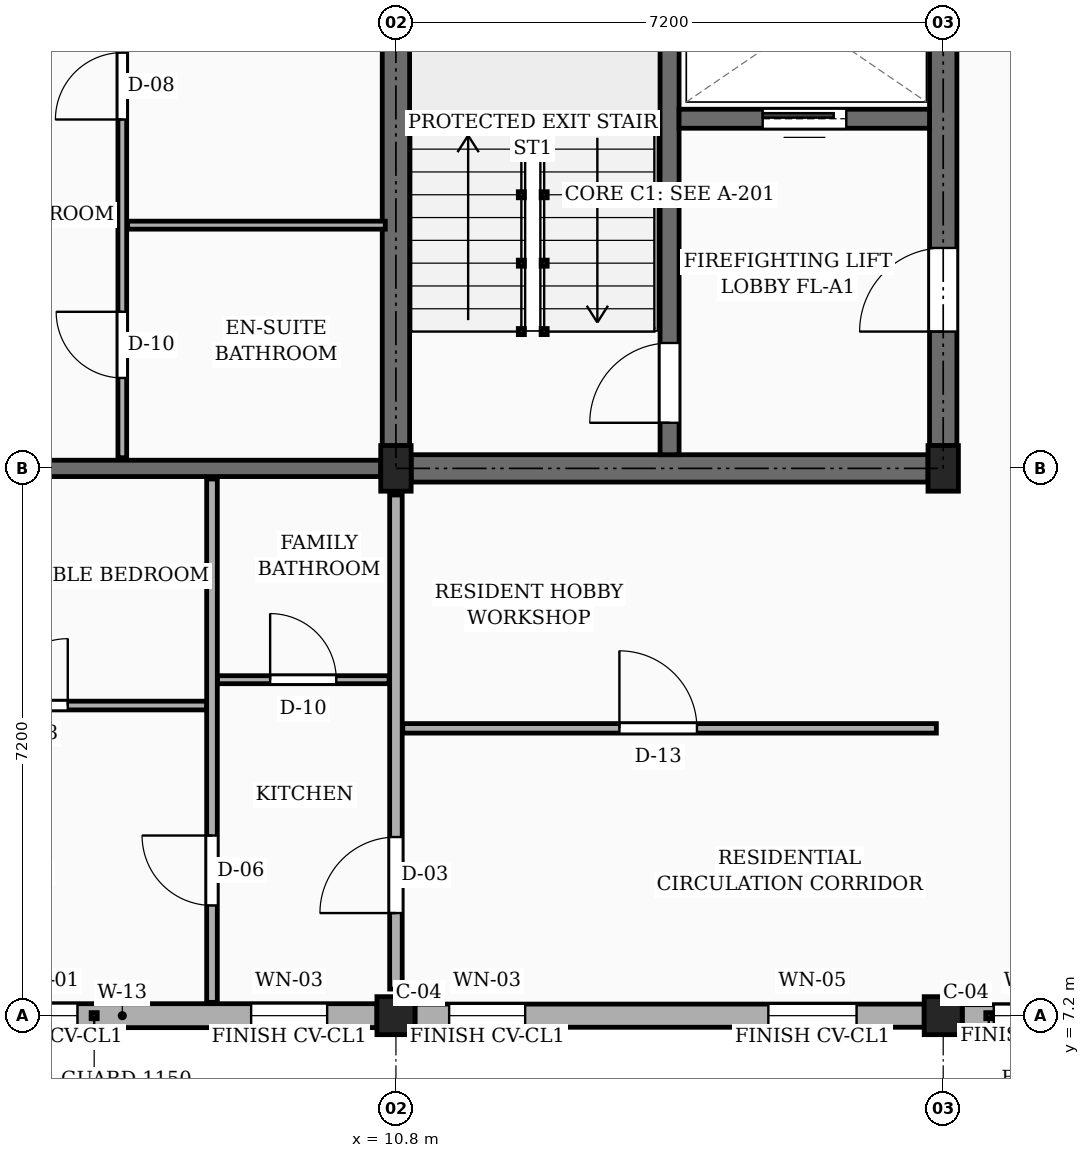
"""IFC4 building model, lengths in metres.
Left out: names, types, materials, properties, quantities, classifications, styles, units other than length and angle.
Written with IfcOpenShell. Run it as: python <this file> out.ifc"""

import sys

from ifc_helpers import new_model, si_unit, direction, frame, frame_2d, origin, origin_2d, place, context, subcontext, project, spatial, rectangle, extrude, element, fill, save


model = new_model("IFC4")
c1 = context("Model", 3, precision=1e-05, world=origin(), true_north=direction((0.0, 1.0)))
c2 = subcontext(c1, "Body", "Model", "MODEL_VIEW")
j1 = project(units=[si_unit("LENGTHUNIT", "METRE"), si_unit("PLANEANGLEUNIT", "RADIAN")], contexts=[c1])
p1 = place(None, origin())
s1 = spatial("IfcSite", under=j1, at=p1, CompositionType="ELEMENT")
p2 = place(p1, origin())
s2 = spatial("IfcBuilding", under=s1, at=p2, CompositionType="ELEMENT")
p3 = place(p2, frame((0.0, 0.0, 26.55)))
s3 = spatial("IfcBuildingStorey", under=s2, at=p3, CompositionType="ELEMENT", Elevation=26.55)
p4 = place(p3, frame((10.8, 7.2, 0.0), z_axis=(0.0, 0.0, 1.0), x_axis=(1.0, 0.0, 0.0)))
e1 = element("IfcColumn", 1, at=p4, inside=s3, PredefinedType="COLUMN", context=c2, shape_type="SweptSolid", body=[
    extrude(rectangle(XDim=0.5, YDim=0.5, at=origin_2d()), origin(), (0.0, 0.0, 1.0), 3.15),
])
p5 = place(p3, frame((10.8, 14.4, 0.0), z_axis=(0.0, 0.0, 1.0), x_axis=(1.0, 0.0, 0.0)))
e2 = element("IfcColumn", 2, at=p5, inside=s3, PredefinedType="COLUMN", context=c2, shape_type="SweptSolid", body=[
    extrude(rectangle(XDim=0.4, YDim=0.6, at=origin_2d()), origin(), (0.0, 0.0, 1.0), 3.15),
])
p6 = place(p3, frame((18.0, 7.2, 0.0), z_axis=(0.0, 0.0, 1.0), x_axis=(1.0, 0.0, 0.0)))
e3 = element("IfcColumn", 3, at=p6, inside=s3, PredefinedType="COLUMN", context=c2, shape_type="SweptSolid", body=[
    extrude(rectangle(XDim=0.5, YDim=0.5, at=origin_2d()), origin(), (0.0, 0.0, 1.0), 3.15),
])
p7 = place(p3, frame((18.0, 14.4, 0.0), z_axis=(0.0, 0.0, 1.0), x_axis=(1.0, 0.0, 0.0)))
e4 = element("IfcColumn", 4, at=p7, inside=s3, PredefinedType="COLUMN", context=c2, shape_type="SweptSolid", body=[
    extrude(rectangle(XDim=0.4, YDim=0.6, at=origin_2d()), origin(), (0.0, 0.0, 1.0), 3.15),
])
p8 = place(p3, frame((3.85, 14.4, 0.0), z_axis=(0.0, 0.0, 1.0), x_axis=(1.0, 0.0, 0.0)))
e5 = element("IfcWall", 5, at=p8, inside=s3, PredefinedType="SOLIDWALL", context=c2, shape_type="SweptSolid", body=[
    extrude(rectangle(XDim=6.75, YDim=0.215, at=frame_2d((3.375, 0.0))), origin(), (0.0, 0.0, 1.0), 2.17),
])
p9 = place(p8, frame((1.35, 0.0, 0.0)))
e6 = element("IfcOpeningElement", 6, at=p9, cuts=e5, PredefinedType="OPENING", context=c2, shape_type="SweptSolid", body=[
    extrude(rectangle(XDim=0.98, YDim=2.12, at=frame_2d((0.49, 1.06))), frame((0.0, 0.118, 0.0), z_axis=(0.0, -1.0, 0.0), x_axis=(1.0, 0.0, 0.0)), (0.0, 0.0, 1.0), 0.235),
])
p10 = place(p3, frame((3.85, 7.2, 0.0), z_axis=(0.0, 0.0, 1.0), x_axis=(1.0, 0.0, 0.0)))
e7 = element("IfcWall", 7, at=p10, inside=s3, PredefinedType="SOLIDWALL", context=c2, shape_type="SweptSolid", body=[
    extrude(rectangle(XDim=6.7, YDim=0.315, at=frame_2d((3.35, 0.0))), origin(), (0.0, 0.0, 1.0), 2.44),
])
p11 = place(p10, frame((1.91, 0.0, 0.78)))
e8 = element("IfcOpeningElement", 8, at=p11, cuts=e7, PredefinedType="OPENING", context=c2, shape_type="SweptSolid", body=[
    extrude(rectangle(XDim=0.85, YDim=1.15, at=frame_2d((0.425, 0.575))), frame((0.0, 0.167, 0.0), z_axis=(0.0, -1.0, 0.0), x_axis=(1.0, 0.0, 0.0)), (0.0, 0.0, 1.0), 0.335),
])
p12 = place(p10, frame((5.045, 0.0, 0.78)))
e9 = element("IfcOpeningElement", 9, at=p12, cuts=e7, PredefinedType="OPENING", context=c2, shape_type="SweptSolid", body=[
    extrude(rectangle(XDim=1.0, YDim=1.15, at=frame_2d((0.5, 0.575))), frame((0.0, 0.167, 0.0), z_axis=(0.0, -1.0, 0.0), x_axis=(1.0, 0.0, 0.0)), (0.0, 0.0, 1.0), 0.335),
])
p13 = place(p3, frame((11.05, 7.2, 0.0), z_axis=(0.0, 0.0, 1.0), x_axis=(1.0, 0.0, 0.0)))
e10 = element("IfcWall", 10, at=p13, inside=s3, PredefinedType="SOLIDWALL", context=c2, shape_type="SweptSolid", body=[
    extrude(rectangle(XDim=6.7, YDim=0.305, at=frame_2d((3.35, 0.0))), origin(), (0.0, 0.0, 1.0), 2.44),
])
p14 = place(p13, frame((0.45, 0.0, 0.78)))
e11 = element("IfcOpeningElement", 11, at=p14, cuts=e10, PredefinedType="OPENING", context=c2, shape_type="SweptSolid", body=[
    extrude(rectangle(XDim=1.0, YDim=1.15, at=frame_2d((0.5, 0.575))), frame((0.0, 0.163, 0.0), z_axis=(0.0, -1.0, 0.0), x_axis=(1.0, 0.0, 0.0)), (0.0, 0.0, 1.0), 0.325),
])
p15 = place(p13, frame((4.65, 0.0, 0.78)))
e12 = element("IfcOpeningElement", 12, at=p15, cuts=e10, PredefinedType="OPENING", context=c2, shape_type="SweptSolid", body=[
    extrude(rectangle(XDim=1.16, YDim=1.15, at=frame_2d((0.58, 0.575))), frame((0.0, 0.163, 0.0), z_axis=(0.0, -1.0, 0.0), x_axis=(1.0, 0.0, 0.0)), (0.0, 0.0, 1.0), 0.325),
])
p16 = place(p3, frame((18.25, 7.2, 0.0), z_axis=(0.0, 0.0, 1.0), x_axis=(1.0, 0.0, 0.0)))
e13 = element("IfcWall", 13, at=p16, inside=s3, PredefinedType="SOLIDWALL", context=c2, shape_type="SweptSolid", body=[
    extrude(rectangle(XDim=6.7, YDim=0.29, at=frame_2d((3.35, 0.0))), origin(), (0.0, 0.0, 1.0), 2.44),
])
p17 = place(p16, frame((0.415, 0.0, 0.78)))
e14 = element("IfcOpeningElement", 14, at=p17, cuts=e13, PredefinedType="OPENING", context=c2, shape_type="SweptSolid", body=[
    extrude(rectangle(XDim=1.16, YDim=1.15, at=frame_2d((0.58, 0.575))), frame((0.0, 0.155, 0.0), z_axis=(0.0, -1.0, 0.0), x_axis=(1.0, 0.0, 0.0)), (0.0, 0.0, 1.0), 0.31),
])
p18 = place(p16, frame((2.78, 0.0, 0.78)))
e15 = element("IfcOpeningElement", 15, at=p18, cuts=e13, PredefinedType="OPENING", context=c2, shape_type="SweptSolid", body=[
    extrude(rectangle(XDim=1.32, YDim=1.15, at=frame_2d((0.66, 0.575))), frame((0.0, 0.155, 0.0), z_axis=(0.0, -1.0, 0.0), x_axis=(1.0, 0.0, 0.0)), (0.0, 0.0, 1.0), 0.31),
])
p19 = place(p16, frame((5.355, 0.0, 0.78)))
e16 = element("IfcOpeningElement", 16, at=p19, cuts=e13, PredefinedType="OPENING", context=c2, shape_type="SweptSolid", body=[
    extrude(rectangle(XDim=0.88, YDim=1.26, at=frame_2d((0.44, 0.63))), frame((0.0, 0.155, 0.0), z_axis=(0.0, -1.0, 0.0), x_axis=(1.0, 0.0, 0.0)), (0.0, 0.0, 1.0), 0.31),
])
p20 = place(p3, frame((10.8, 14.7, 0.0), z_axis=(0.0, 0.0, 1.0), x_axis=(0.0, 1.0, 0.0)))
e17 = element("IfcWall", 17, at=p20, inside=s3, PredefinedType="SHEAR", context=c2, shape_type="SweptSolid", body=[
    extrude(rectangle(XDim=6.6, YDim=0.36, at=frame_2d((3.3, 0.0))), origin(), (0.0, 0.0, 1.0), 2.87),
])
p21 = place(p3, frame((18.0, 14.7, 0.0), z_axis=(0.0, 0.0, 1.0), x_axis=(0.0, 1.0, 0.0)))
e18 = element("IfcWall", 18, at=p21, inside=s3, PredefinedType="SHEAR", context=c2, shape_type="SweptSolid", body=[
    extrude(rectangle(XDim=6.6, YDim=0.36, at=frame_2d((3.3, 0.0))), origin(), (0.0, 0.0, 1.0), 2.87),
])
p22 = place(p21, frame((1.5, 0.0, 0.0)))
e19 = element("IfcOpeningElement", 19, at=p22, cuts=e18, PredefinedType="OPENING", context=c2, shape_type="SweptSolid", body=[
    extrude(rectangle(XDim=1.1, YDim=2.15, at=frame_2d((0.55, 1.075))), frame((0.0, 0.19, 0.0), z_axis=(0.0, -1.0, 0.0), x_axis=(1.0, 0.0, 0.0)), (0.0, 0.0, 1.0), 0.38),
])
p23 = place(p3, frame((11.0, 14.4, 0.0), z_axis=(0.0, 0.0, 1.0), x_axis=(1.0, 0.0, 0.0)))
e20 = element("IfcWall", 20, at=p23, inside=s3, PredefinedType="SHEAR", context=c2, shape_type="SweptSolid", body=[
    extrude(rectangle(XDim=6.8, YDim=0.36, at=frame_2d((3.4, 0.0))), origin(), (0.0, 0.0, 1.0), 2.87),
])
p24 = place(p3, frame((14.4, 14.58, 0.0), z_axis=(0.0, 0.0, 1.0), x_axis=(0.0, 1.0, 0.0)))
e21 = element("IfcWall", 21, at=p24, inside=s3, PredefinedType="SHEAR", context=c2, shape_type="SweptSolid", body=[
    extrude(rectangle(XDim=6.84, YDim=0.25, at=frame_2d((3.42, 0.0))), origin(), (0.0, 0.0, 1.0), 2.87),
])
p25 = place(p24, frame((0.42, 0.0, 0.0)))
e22 = element("IfcOpeningElement", 22, at=p25, cuts=e21, PredefinedType="OPENING", context=c2, shape_type="SweptSolid", body=[
    extrude(rectangle(XDim=1.05, YDim=2.15, at=frame_2d((0.525, 1.075))), frame((0.0, 0.135, 0.0), z_axis=(0.0, -1.0, 0.0), x_axis=(1.0, 0.0, 0.0)), (0.0, 0.0, 1.0), 0.27),
])
p26 = place(p3, frame((14.525, 19.0, 0.0), z_axis=(0.0, 0.0, 1.0), x_axis=(1.0, 0.0, 0.0)))
e23 = element("IfcWall", 23, at=p26, inside=s3, PredefinedType="SHEAR", context=c2, shape_type="SweptSolid", body=[
    extrude(rectangle(XDim=3.295, YDim=0.25, at=frame_2d((1.647, 0.0))), origin(), (0.0, 0.0, 1.0), 2.87),
])
p27 = place(p26, frame((1.1, 0.0, 0.0)))
e24 = element("IfcOpeningElement", 24, at=p27, cuts=e23, PredefinedType="OPENING", context=c2, shape_type="SweptSolid", body=[
    extrude(rectangle(XDim=1.1, YDim=2.2, at=frame_2d((0.55, 1.1))), frame((0.0, 0.135, 0.0), z_axis=(0.0, -1.0, 0.0), x_axis=(1.0, 0.0, 0.0)), (0.0, 0.0, 1.0), 0.27),
])
p28 = place(p3, frame((10.8, 7.55, 0.0), z_axis=(0.0, 0.0, 1.0), x_axis=(0.0, 1.0, 0.0)))
e25 = element("IfcWall", 25, at=p28, inside=s3, PredefinedType="PARTITIONING", context=c2, shape_type="SweptSolid", body=[
    extrude(rectangle(XDim=6.5, YDim=0.165, at=frame_2d((3.25, 0.0))), origin(), (0.0, 0.0, 1.0), 2.305),
])
p29 = place(p28, frame((1.0, 0.0, 0.0)))
e26 = element("IfcOpeningElement", 26, at=p29, cuts=e25, PredefinedType="OPENING", context=c2, shape_type="SweptSolid", body=[
    extrude(rectangle(XDim=1.0, YDim=2.15, at=frame_2d((0.5, 1.075))), frame((0.0, 0.093, 0.0), z_axis=(0.0, -1.0, 0.0), x_axis=(1.0, 0.0, 0.0)), (0.0, 0.0, 1.0), 0.185),
])
p30 = place(p3, frame((10.89, 10.98, 0.0), z_axis=(0.0, 0.0, 1.0), x_axis=(1.0, 0.0, 0.0)))
e27 = element("IfcWall", 27, at=p30, inside=s3, PredefinedType="PARTITIONING", context=c2, shape_type="SweptSolid", body=[
    extrude(rectangle(XDim=7.02, YDim=0.125, at=frame_2d((3.51, 0.0))), origin(), (0.0, 0.0, 1.0), 2.305),
])
p31 = place(p30, frame((2.85, 0.0, 0.0)))
e28 = element("IfcOpeningElement", 28, at=p31, cuts=e27, PredefinedType="OPENING", context=c2, shape_type="SweptSolid", body=[
    extrude(rectangle(XDim=1.02, YDim=2.15, at=frame_2d((0.51, 1.075))), frame((0.0, 0.073, 0.0), z_axis=(0.0, -1.0, 0.0), x_axis=(1.0, 0.0, 0.0)), (0.0, 0.0, 1.0), 0.145),
])
p32 = place(p3, frame((3.775, 11.28, 0.0), z_axis=(0.0, 0.0, 1.0), x_axis=(1.0, 0.0, 0.0)))
e29 = element("IfcWall", 29, at=p32, inside=s3, PredefinedType="PARTITIONING", context=c2, shape_type="SweptSolid", body=[
    extrude(rectangle(XDim=4.535, YDim=0.115, at=frame_2d((2.268, 0.0))), origin(), (0.0, 0.0, 1.0), 2.305),
])
p33 = place(p32, frame((1.827, 0.0, 0.0)))
e30 = element("IfcOpeningElement", 30, at=p33, cuts=e29, PredefinedType="OPENING", context=c2, shape_type="SweptSolid", body=[
    extrude(rectangle(XDim=0.88, YDim=2.08, at=frame_2d((0.44, 1.04))), frame((0.0, 0.067, 0.0), z_axis=(0.0, -1.0, 0.0), x_axis=(1.0, 0.0, 0.0)), (0.0, 0.0, 1.0), 0.135),
])
p34 = place(p3, frame((8.45, 11.62, 0.0), z_axis=(0.0, 0.0, 1.0), x_axis=(1.0, 0.0, 0.0)))
e31 = element("IfcWall", 31, at=p34, inside=s3, PredefinedType="PARTITIONING", context=c2, shape_type="SweptSolid", body=[
    extrude(rectangle(XDim=2.26, YDim=0.105, at=frame_2d((1.13, 0.0))), origin(), (0.0, 0.0, 1.0), 2.305),
])
p35 = place(p34, frame((0.695, 0.0, 0.0)))
e32 = element("IfcOpeningElement", 32, at=p35, cuts=e31, PredefinedType="OPENING", context=c2, shape_type="SweptSolid", body=[
    extrude(rectangle(XDim=0.87, YDim=2.05, at=frame_2d((0.435, 1.025))), frame((0.0, 0.062, 0.0), z_axis=(0.0, -1.0, 0.0), x_axis=(1.0, 0.0, 0.0)), (0.0, 0.0, 1.0), 0.125),
])
p36 = place(p3, frame((8.38, 7.375, 0.0), z_axis=(0.0, 0.0, 1.0), x_axis=(0.0, 1.0, 0.0)))
e33 = element("IfcWall", 33, at=p36, inside=s3, PredefinedType="PARTITIONING", context=c2, shape_type="SweptSolid", body=[
    extrude(rectangle(XDim=6.885, YDim=0.14, at=frame_2d((3.442, 0.0))), origin(), (0.0, 0.0, 1.0), 2.305),
])
p37 = place(p36, frame((1.275, 0.0, 0.0)))
e34 = element("IfcOpeningElement", 34, at=p37, cuts=e33, PredefinedType="OPENING", context=c2, shape_type="SweptSolid", body=[
    extrude(rectangle(XDim=0.92, YDim=2.1, at=frame_2d((0.46, 1.05))), frame((0.0, 0.08, 0.0), z_axis=(0.0, -1.0, 0.0), x_axis=(1.0, 0.0, 0.0)), (0.0, 0.0, 1.0), 0.16),
])
p38 = place(p3, frame((7.2, 14.54, 0.0), z_axis=(0.0, 0.0, 1.0), x_axis=(0.0, 1.0, 0.0)))
e35 = element("IfcWall", 35, at=p38, inside=s3, PredefinedType="PARTITIONING", context=c2, shape_type="SweptSolid", body=[
    extrude(rectangle(XDim=6.92, YDim=0.115, at=frame_2d((3.46, 0.0))), origin(), (0.0, 0.0, 1.0), 2.305),
])
p39 = place(p38, frame((1.05, 0.0, 0.0)))
e36 = element("IfcOpeningElement", 36, at=p39, cuts=e35, PredefinedType="OPENING", context=c2, shape_type="SweptSolid", body=[
    extrude(rectangle(XDim=0.87, YDim=2.05, at=frame_2d((0.435, 1.025))), frame((0.0, 0.067, 0.0), z_axis=(0.0, -1.0, 0.0), x_axis=(1.0, 0.0, 0.0)), (0.0, 0.0, 1.0), 0.135),
])
p40 = place(p38, frame((4.45, 0.0, 0.0)))
e37 = element("IfcOpeningElement", 37, at=p40, cuts=e35, PredefinedType="OPENING", context=c2, shape_type="SweptSolid", body=[
    extrude(rectangle(XDim=0.88, YDim=2.08, at=frame_2d((0.44, 1.04))), frame((0.0, 0.067, 0.0), z_axis=(0.0, -1.0, 0.0), x_axis=(1.0, 0.0, 0.0)), (0.0, 0.0, 1.0), 0.135),
])
p41 = place(p3, frame((7.27, 17.6, 0.0), z_axis=(0.0, 0.0, 1.0), x_axis=(1.0, 0.0, 0.0)))
e38 = element("IfcWall", 38, at=p41, inside=s3, PredefinedType="PARTITIONING", context=c2, shape_type="SweptSolid", body=[
    extrude(rectangle(XDim=3.39, YDim=0.105, at=frame_2d((1.695, 0.0))), origin(), (0.0, 0.0, 1.0), 2.305),
])
p42 = place(p11, origin())
e39 = element("IfcWindow", 39, at=p42, inside=s3, PartitioningType="SINGLE_PANEL", PredefinedType="WINDOW", context=c2, shape_type="SweptSolid", body=[
    extrude(rectangle(XDim=0.85, YDim=1.15, at=frame_2d((0.425, 0.575))), frame((0.0, 0.03, 0.0), z_axis=(0.0, -1.0, 0.0), x_axis=(1.0, 0.0, 0.0)), (0.0, 0.0, 1.0), 0.06),
])
fill(e8, e39)
p43 = place(p12, origin())
e40 = element("IfcWindow", 40, at=p43, inside=s3, PartitioningType="SINGLE_PANEL", PredefinedType="WINDOW", context=c2, shape_type="SweptSolid", body=[
    extrude(rectangle(XDim=1.0, YDim=1.15, at=frame_2d((0.5, 0.575))), frame((0.0, 0.03, 0.0), z_axis=(0.0, -1.0, 0.0), x_axis=(1.0, 0.0, 0.0)), (0.0, 0.0, 1.0), 0.06),
])
fill(e9, e40)
p44 = place(p14, origin())
e41 = element("IfcWindow", 41, at=p44, inside=s3, PartitioningType="SINGLE_PANEL", PredefinedType="WINDOW", context=c2, shape_type="SweptSolid", body=[
    extrude(rectangle(XDim=1.0, YDim=1.15, at=frame_2d((0.5, 0.575))), frame((0.0, 0.03, 0.0), z_axis=(0.0, -1.0, 0.0), x_axis=(1.0, 0.0, 0.0)), (0.0, 0.0, 1.0), 0.06),
])
fill(e11, e41)
p45 = place(p15, origin())
e42 = element("IfcWindow", 42, at=p45, inside=s3, PartitioningType="SINGLE_PANEL", PredefinedType="WINDOW", context=c2, shape_type="SweptSolid", body=[
    extrude(rectangle(XDim=1.16, YDim=1.15, at=frame_2d((0.58, 0.575))), frame((0.0, 0.03, 0.0), z_axis=(0.0, -1.0, 0.0), x_axis=(1.0, 0.0, 0.0)), (0.0, 0.0, 1.0), 0.06),
])
fill(e12, e42)
p46 = place(p17, origin())
e43 = element("IfcWindow", 43, at=p46, inside=s3, PartitioningType="SINGLE_PANEL", PredefinedType="WINDOW", context=c2, shape_type="SweptSolid", body=[
    extrude(rectangle(XDim=1.16, YDim=1.15, at=frame_2d((0.58, 0.575))), frame((0.0, 0.03, 0.0), z_axis=(0.0, -1.0, 0.0), x_axis=(1.0, 0.0, 0.0)), (0.0, 0.0, 1.0), 0.06),
])
fill(e14, e43)
p47 = place(p22, frame((1.1, 0.0, 0.0), z_axis=(0.0, 0.0, 1.0), x_axis=(-1.0, 0.0, 0.0)))
e44 = element("IfcDoor", 44, at=p47, inside=s3, OperationType="SINGLE_SWING_LEFT", PredefinedType="DOOR", context=c2, shape_type="SweptSolid", body=[
    extrude(rectangle(XDim=1.1, YDim=2.15, at=frame_2d((0.55, 1.075))), frame((0.0, 0.025, 0.0), z_axis=(0.0, -1.0, 0.0), x_axis=(1.0, 0.0, 0.0)), (0.0, 0.0, 1.0), 0.05),
])
fill(e19, e44)
p48 = place(p25, origin())
e45 = element("IfcDoor", 45, at=p48, inside=s3, OperationType="SINGLE_SWING_LEFT", PredefinedType="DOOR", context=c2, shape_type="SweptSolid", body=[
    extrude(rectangle(XDim=1.05, YDim=2.15, at=frame_2d((0.525, 1.075))), frame((0.0, 0.025, 0.0), z_axis=(0.0, -1.0, 0.0), x_axis=(1.0, 0.0, 0.0)), (0.0, 0.0, 1.0), 0.05),
])
fill(e22, e45)
p49 = place(p27, origin())
e46 = element("IfcDoor", 46, at=p49, inside=s3, OperationType="SLIDING_TO_LEFT", PredefinedType="DOOR", context=c2, shape_type="SweptSolid", body=[
    extrude(rectangle(XDim=1.1, YDim=2.2, at=frame_2d((0.55, 1.1))), frame((0.0, 0.025, 0.0), z_axis=(0.0, -1.0, 0.0), x_axis=(1.0, 0.0, 0.0)), (0.0, 0.0, 1.0), 0.05),
])
fill(e24, e46)
p50 = place(p29, origin())
e47 = element("IfcDoor", 47, at=p50, inside=s3, OperationType="SINGLE_SWING_LEFT", PredefinedType="DOOR", context=c2, shape_type="SweptSolid", body=[
    extrude(rectangle(XDim=1.0, YDim=2.15, at=frame_2d((0.5, 1.075))), frame((0.0, 0.025, 0.0), z_axis=(0.0, -1.0, 0.0), x_axis=(1.0, 0.0, 0.0)), (0.0, 0.0, 1.0), 0.05),
])
fill(e26, e47)
p51 = place(p31, origin())
e48 = element("IfcDoor", 48, at=p51, inside=s3, OperationType="SINGLE_SWING_LEFT", PredefinedType="DOOR", context=c2, shape_type="SweptSolid", body=[
    extrude(rectangle(XDim=1.02, YDim=2.15, at=frame_2d((0.51, 1.075))), frame((0.0, 0.025, 0.0), z_axis=(0.0, -1.0, 0.0), x_axis=(1.0, 0.0, 0.0)), (0.0, 0.0, 1.0), 0.05),
])
fill(e28, e48)
p52 = place(p33, origin())
e49 = element("IfcDoor", 49, at=p52, inside=s3, OperationType="SINGLE_SWING_RIGHT", PredefinedType="DOOR", context=c2, shape_type="SweptSolid", body=[
    extrude(rectangle(XDim=0.88, YDim=2.08, at=frame_2d((0.44, 1.04))), frame((0.0, 0.025, 0.0), z_axis=(0.0, -1.0, 0.0), x_axis=(1.0, 0.0, 0.0)), (0.0, 0.0, 1.0), 0.05),
])
fill(e30, e49)
p53 = place(p35, origin())
e50 = element("IfcDoor", 50, at=p53, inside=s3, OperationType="SINGLE_SWING_LEFT", PredefinedType="DOOR", context=c2, shape_type="SweptSolid", body=[
    extrude(rectangle(XDim=0.87, YDim=2.05, at=frame_2d((0.435, 1.025))), frame((0.0, 0.025, 0.0), z_axis=(0.0, -1.0, 0.0), x_axis=(1.0, 0.0, 0.0)), (0.0, 0.0, 1.0), 0.05),
])
fill(e32, e50)
p54 = place(p37, origin())
e51 = element("IfcDoor", 51, at=p54, inside=s3, OperationType="SINGLE_SWING_RIGHT", PredefinedType="DOOR", context=c2, shape_type="SweptSolid", body=[
    extrude(rectangle(XDim=0.92, YDim=2.1, at=frame_2d((0.46, 1.05))), frame((0.0, 0.025, 0.0), z_axis=(0.0, -1.0, 0.0), x_axis=(1.0, 0.0, 0.0)), (0.0, 0.0, 1.0), 0.05),
])
fill(e34, e51)
p55 = place(p39, origin())
e52 = element("IfcDoor", 52, at=p55, inside=s3, OperationType="SINGLE_SWING_RIGHT", PredefinedType="DOOR", context=c2, shape_type="SweptSolid", body=[
    extrude(rectangle(XDim=0.87, YDim=2.05, at=frame_2d((0.435, 1.025))), frame((0.0, 0.025, 0.0), z_axis=(0.0, -1.0, 0.0), x_axis=(1.0, 0.0, 0.0)), (0.0, 0.0, 1.0), 0.05),
])
fill(e36, e52)
p56 = place(p40, origin())
e53 = element("IfcDoor", 53, at=p56, inside=s3, OperationType="SINGLE_SWING_LEFT", PredefinedType="DOOR", context=c2, shape_type="SweptSolid", body=[
    extrude(rectangle(XDim=0.88, YDim=2.08, at=frame_2d((0.44, 1.04))), frame((0.0, 0.025, 0.0), z_axis=(0.0, -1.0, 0.0), x_axis=(1.0, 0.0, 0.0)), (0.0, 0.0, 1.0), 0.05),
])
fill(e37, e53)
save(model, sys.argv[1])
